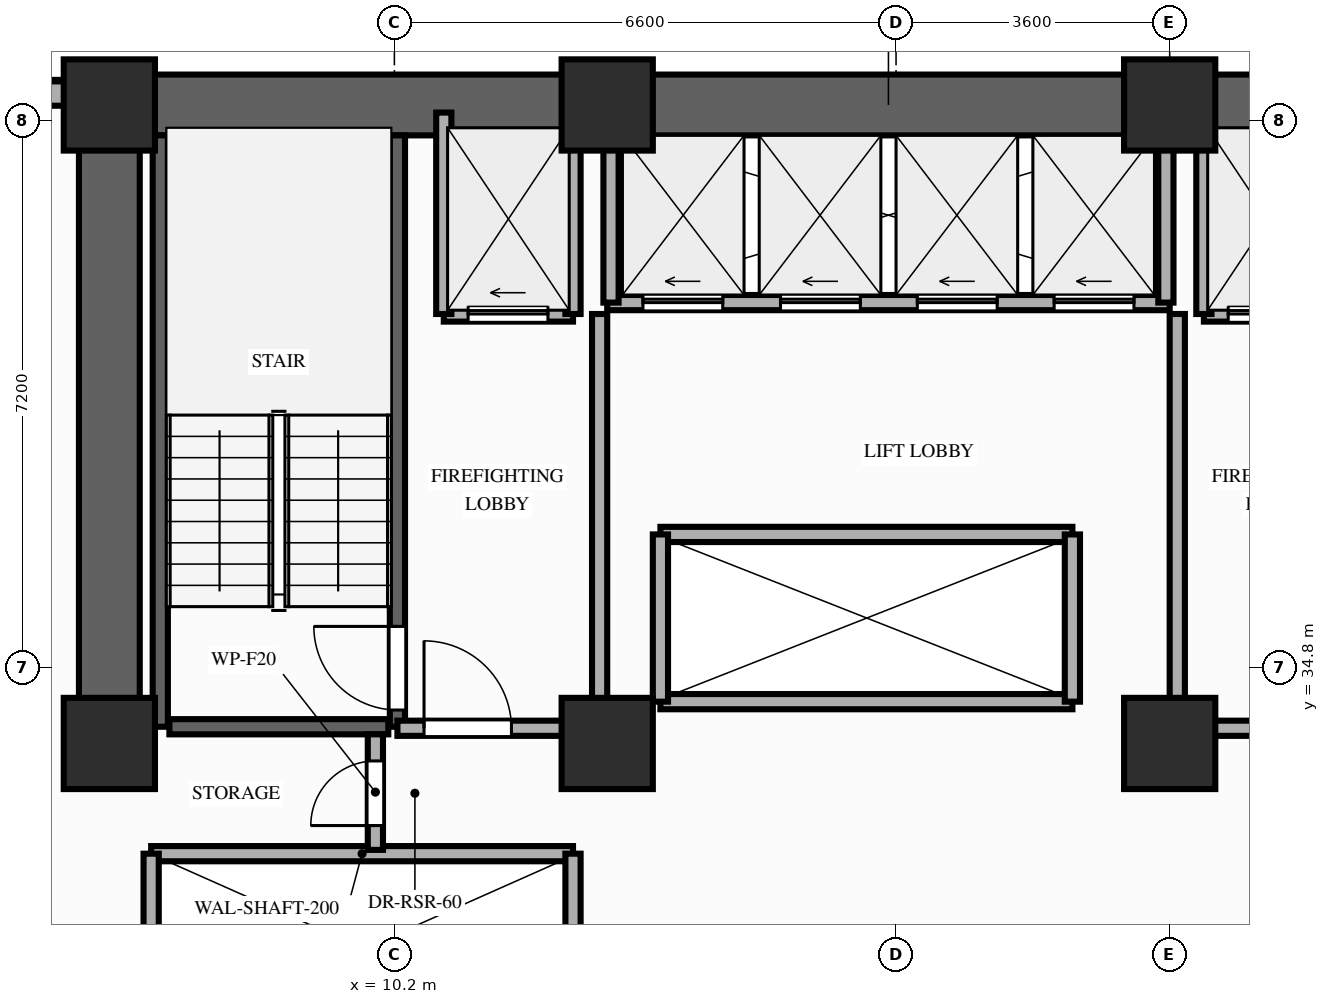
"""IFC4 building model, lengths in metres.
Left out: names, types, materials, properties, quantities, classifications, styles, units other than length and angle.
Written with IfcOpenShell. Run it as: python <this file> out.ifc"""

import sys

from ifc_helpers import new_model, si_unit, direction, frame, frame_2d, origin, origin_2d, place, context, subcontext, project, spatial, rectangle, extrude, element, fill, save


model = new_model("IFC4")
c1 = context("Model", 3, precision=1e-05, world=origin(), true_north=direction((0.0, 1.0)))
c2 = subcontext(c1, "Body", "Model", "MODEL_VIEW")
j1 = project(units=[si_unit("LENGTHUNIT", "METRE"), si_unit("PLANEANGLEUNIT", "RADIAN")], contexts=[c1])
p1 = place(None, origin())
s1 = spatial("IfcSite", under=j1, at=p1, CompositionType="ELEMENT")
p2 = place(p1, origin())
s2 = spatial("IfcBuilding", under=s1, at=p2, CompositionType="ELEMENT")
p3 = place(p2, frame((0.0, 0.0, 66.0)))
s3 = spatial("IfcBuildingStorey", under=s2, at=p3, CompositionType="ELEMENT", Elevation=66.0)
for number, where, z_axis, x_axis in (
    (1, (6.45, 33.8, 0.0), (0.0, 0.0, 1.0), (1.0, 0.0, 0.0)),
    (2, (13.0, 33.8, 0.0), (0.0, 0.0, 1.0), (1.0, 0.0, 0.0)),
    (3, (20.4, 33.8, 0.0), (0.0, 0.0, 1.0), (1.0, 0.0, 0.0)),
    (4, (6.45, 42.2, 0.0), (0.0, 0.0, 1.0), (1.0, 0.0, 0.0)),
    (5, (13.0, 42.2, 0.0), (0.0, 0.0, 1.0), (1.0, 0.0, 0.0)),
    (6, (20.4, 42.2, 0.0), (0.0, 0.0, 1.0), (1.0, 0.0, 0.0)),
):
    element("IfcColumn", number, at=place(p3, frame(where, z_axis=z_axis, x_axis=x_axis)), inside=s3, PredefinedType="COLUMN", context=c2, shape_type="SweptSolid", body=[
        extrude(rectangle(XDim=1.2, YDim=1.2, at=origin_2d()), origin(), (0.0, 0.0, 1.0), 3.2),
    ])
p4 = place(p3, frame((6.0, 42.35, 0.0), z_axis=(0.0, 0.0, 1.0), x_axis=(-1.0, 0.0, 0.0)))
e7 = element("IfcWall", 7, at=p4, inside=s3, PredefinedType="STANDARD", context=c2, shape_type="SweptSolid", body=[
    extrude(rectangle(XDim=2.0, YDim=0.32, at=frame_2d((1.0, 0.0))), origin(), (0.0, 0.0, 1.0), 3.02),
])
p5 = place(p3, frame((6.45, 42.2, 0.0), z_axis=(0.0, 0.0, 1.0), x_axis=(1.0, 0.0, 0.0)))
e8 = element("IfcWall", 8, at=p5, inside=s3, PredefinedType="SHEAR", context=c2, shape_type="SweptSolid", body=[
    extrude(rectangle(XDim=20.45, YDim=0.8, at=frame_2d((10.225, 0.0))), origin(), (0.0, 0.0, 1.0), 3.02),
])
p6 = place(p3, frame((6.45, 33.8, 0.0), z_axis=(0.0, 0.0, 1.0), x_axis=(0.0, 1.0, 0.0)))
e9 = element("IfcWall", 9, at=p6, inside=s3, PredefinedType="SHEAR", context=c2, shape_type="SweptSolid", body=[
    extrude(rectangle(XDim=7.95, YDim=0.8, at=frame_2d((3.975, 0.0))), origin(), (0.0, 0.0, 1.0), 3.02),
])
p7 = place(p3, frame((7.12, 34.02, 0.0), z_axis=(0.0, 0.0, 1.0), x_axis=(0.0, 1.0, 0.0)))
e10 = element("IfcWall", 10, at=p7, inside=s3, PredefinedType="SHEAR", context=c2, shape_type="SweptSolid", body=[
    extrude(rectangle(XDim=7.78, YDim=0.2, at=frame_2d((3.89, 0.0))), origin(), (0.0, 0.0, 1.0), 3.02),
])
p8 = place(p3, frame((10.24, 34.02, 0.0), z_axis=(0.0, 0.0, 1.0), x_axis=(0.0, 1.0, 0.0)))
e11 = element("IfcWall", 11, at=p8, inside=s3, PredefinedType="SHEAR", context=c2, shape_type="SweptSolid", body=[
    extrude(rectangle(XDim=7.78, YDim=0.2, at=frame_2d((3.89, 0.0))), origin(), (0.0, 0.0, 1.0), 3.02),
])
p9 = place(p8, frame((0.22, 0.0, 0.0)))
e12 = element("IfcOpeningElement", 12, at=p9, cuts=e11, PredefinedType="OPENING", context=c2, shape_type="SweptSolid", body=[
    extrude(rectangle(XDim=1.1, YDim=2.15, at=frame_2d((0.55, 1.075))), frame((0.0, 0.11, 0.0), z_axis=(0.0, -1.0, 0.0), x_axis=(1.0, 0.0, 0.0)), (0.0, 0.0, 1.0), 0.22),
])
p10 = place(p3, frame((7.24, 34.02, 0.0), z_axis=(0.0, 0.0, 1.0), x_axis=(1.0, 0.0, 0.0)))
e13 = element("IfcWall", 13, at=p10, inside=s3, PredefinedType="SHEAR", context=c2, shape_type="SweptSolid", body=[
    extrude(rectangle(XDim=2.88, YDim=0.2, at=frame_2d((1.44, 0.0))), origin(), (0.0, 0.0, 1.0), 3.02),
])
p11 = place(p3, frame((7.0, 32.35, 0.0), z_axis=(0.0, 0.0, 1.0), x_axis=(1.0, 0.0, 0.0)))
e14 = element("IfcWall", 14, at=p11, inside=s3, PredefinedType="MOVABLE", context=c2, shape_type="SweptSolid", body=[
    extrude(rectangle(XDim=5.55, YDim=0.2, at=frame_2d((2.775, 0.0))), origin(), (0.0, 0.0, 1.0), 3.02),
])
for number, where, z_axis, x_axis in (
    (15, (7.0, 29.85, 0.0), (0.0, 0.0, 1.0), (0.0, 1.0, 0.0)),
    (16, (12.55, 29.85, 0.0), (0.0, 0.0, 1.0), (0.0, 1.0, 0.0)),
):
    element("IfcWall", number, at=place(p3, frame(where, z_axis=z_axis, x_axis=x_axis)), inside=s3, PredefinedType="MOVABLE", context=c2, shape_type="SweptSolid", body=[
        extrude(rectangle(XDim=2.5, YDim=0.2, at=frame_2d((1.25, 0.0))), origin(), (0.0, 0.0, 1.0), 3.02),
    ])
p12 = place(p3, frame((10.85, 39.45, 0.0), z_axis=(0.0, 0.0, 1.0), x_axis=(1.0, 0.0, 0.0)))
e17 = element("IfcWall", 17, at=p12, inside=s3, PredefinedType="MOVABLE", context=c2, shape_type="SweptSolid", body=[
    extrude(rectangle(XDim=1.7, YDim=0.2, at=frame_2d((0.85, 0.0))), origin(), (0.0, 0.0, 1.0), 3.02),
])
p13 = place(p12, frame((0.32, 0.0, 0.0)))
e18 = element("IfcOpeningElement", 18, at=p13, cuts=e17, PredefinedType="OPENING", context=c2, shape_type="SweptSolid", body=[
    extrude(rectangle(XDim=1.05, YDim=2.15, at=frame_2d((0.525, 1.075))), frame((0.0, 0.11, 0.0), z_axis=(0.0, -1.0, 0.0), x_axis=(1.0, 0.0, 0.0)), (0.0, 0.0, 1.0), 0.22),
])
p14 = place(p3, frame((20.85, 39.45, 0.0), z_axis=(0.0, 0.0, 1.0), x_axis=(1.0, 0.0, 0.0)))
e19 = element("IfcWall", 19, at=p14, inside=s3, PredefinedType="MOVABLE", context=c2, shape_type="SweptSolid", body=[
    extrude(rectangle(XDim=1.7, YDim=0.2, at=frame_2d((0.85, 0.0))), origin(), (0.0, 0.0, 1.0), 3.02),
])
p15 = place(p14, frame((0.32, 0.0, 0.0)))
e20 = element("IfcOpeningElement", 20, at=p15, cuts=e19, PredefinedType="OPENING", context=c2, shape_type="SweptSolid", body=[
    extrude(rectangle(XDim=1.05, YDim=2.15, at=frame_2d((0.525, 1.075))), frame((0.0, 0.11, 0.0), z_axis=(0.0, -1.0, 0.0), x_axis=(1.0, 0.0, 0.0)), (0.0, 0.0, 1.0), 0.22),
])
for number, where, z_axis, x_axis in (
    (21, (10.85, 39.45, 0.0), (0.0, 0.0, 1.0), (0.0, 1.0, 0.0)),
    (22, (12.55, 39.45, 0.0), (0.0, 0.0, 1.0), (0.0, 1.0, 0.0)),
):
    element("IfcWall", number, at=place(p3, frame(where, z_axis=z_axis, x_axis=x_axis)), inside=s3, PredefinedType="MOVABLE", context=c2, shape_type="SweptSolid", body=[
        extrude(rectangle(XDim=2.65, YDim=0.2, at=frame_2d((1.325, 0.0))), origin(), (0.0, 0.0, 1.0), 2.41),
    ])
p16 = place(p3, frame((12.9, 34.0, 0.0), z_axis=(0.0, 0.0, 1.0), x_axis=(0.0, 1.0, 0.0)))
e23 = element("IfcWall", 23, at=p16, inside=s3, PredefinedType="PARTITIONING", context=c2, shape_type="SweptSolid", body=[
    extrude(rectangle(XDim=5.45, YDim=0.2, at=frame_2d((2.725, 0.0))), origin(), (0.0, 0.0, 1.0), 2.41),
])
p17 = place(p3, frame((10.24, 34.0, 0.0), z_axis=(0.0, 0.0, 1.0), x_axis=(1.0, 0.0, 0.0)))
e24 = element("IfcWall", 24, at=p17, inside=s3, PredefinedType="PARTITIONING", context=c2, shape_type="SweptSolid", body=[
    extrude(rectangle(XDim=2.66, YDim=0.2, at=frame_2d((1.33, 0.0))), origin(), (0.0, 0.0, 1.0), 2.41),
])
p18 = place(p17, frame((0.35, 0.0, 0.0)))
e25 = element("IfcOpeningElement", 25, at=p18, cuts=e24, PredefinedType="OPENING", context=c2, shape_type="SweptSolid", body=[
    extrude(rectangle(XDim=1.15, YDim=2.15, at=frame_2d((0.575, 1.075))), frame((0.0, 0.11, 0.0), z_axis=(0.0, -1.0, 0.0), x_axis=(1.0, 0.0, 0.0)), (0.0, 0.0, 1.0), 0.22),
])
p19 = place(p3, frame((20.85, 39.45, 0.0), z_axis=(0.0, 0.0, 1.0), x_axis=(0.0, 1.0, 0.0)))
e26 = element("IfcWall", 26, at=p19, inside=s3, PredefinedType="MOVABLE", context=c2, shape_type="SweptSolid", body=[
    extrude(rectangle(XDim=2.65, YDim=0.2, at=frame_2d((1.325, 0.0))), origin(), (0.0, 0.0, 1.0), 2.41),
])
p20 = place(p3, frame((20.5, 34.0, 0.0), z_axis=(0.0, 0.0, 1.0), x_axis=(0.0, 1.0, 0.0)))
e27 = element("IfcWall", 27, at=p20, inside=s3, PredefinedType="PARTITIONING", context=c2, shape_type="SweptSolid", body=[
    extrude(rectangle(XDim=5.45, YDim=0.2, at=frame_2d((2.725, 0.0))), origin(), (0.0, 0.0, 1.0), 2.41),
])
p21 = place(p3, frame((20.5, 34.0, 0.0), z_axis=(0.0, 0.0, 1.0), x_axis=(1.0, 0.0, 0.0)))
e28 = element("IfcWall", 28, at=p21, inside=s3, PredefinedType="PARTITIONING", context=c2, shape_type="SweptSolid", body=[
    extrude(rectangle(XDim=2.6, YDim=0.2, at=frame_2d((1.3, 0.0))), origin(), (0.0, 0.0, 1.0), 2.41),
])
p22 = place(p21, frame((1.05, 0.0, 0.0)))
e29 = element("IfcOpeningElement", 29, at=p22, cuts=e28, PredefinedType="OPENING", context=c2, shape_type="SweptSolid", body=[
    extrude(rectangle(XDim=1.15, YDim=2.15, at=frame_2d((0.575, 1.075))), frame((0.0, 0.11, 0.0), z_axis=(0.0, -1.0, 0.0), x_axis=(1.0, 0.0, 0.0)), (0.0, 0.0, 1.0), 0.22),
])
p23 = place(p3, frame((9.95, 32.4, 0.0), z_axis=(0.0, 0.0, 1.0), x_axis=(0.0, 1.0, 0.0)))
e30 = element("IfcWall", 30, at=p23, inside=s3, PredefinedType="PARTITIONING", context=c2, shape_type="SweptSolid", body=[
    extrude(rectangle(XDim=1.52, YDim=0.2, at=frame_2d((0.76, 0.0))), origin(), (0.0, 0.0, 1.0), 2.41),
])
p24 = place(p23, frame((0.32, 0.0, 0.0)))
e31 = element("IfcOpeningElement", 31, at=p24, cuts=e30, PredefinedType="OPENING", context=c2, shape_type="SweptSolid", body=[
    extrude(rectangle(XDim=0.85, YDim=2.05, at=frame_2d((0.425, 1.025))), frame((0.0, 0.11, 0.0), z_axis=(0.0, -1.0, 0.0), x_axis=(1.0, 0.0, 0.0)), (0.0, 0.0, 1.0), 0.22),
])
p25 = place(p3, frame((13.0, 39.6, 0.0), z_axis=(0.0, 0.0, 1.0), x_axis=(1.0, 0.0, 0.0)))
e32 = element("IfcWall", 32, at=p25, inside=s3, PredefinedType="MOVABLE", context=c2, shape_type="SweptSolid", body=[
    extrude(rectangle(XDim=7.4, YDim=0.2, at=frame_2d((3.7, 0.0))), origin(), (0.0, 0.0, 1.0), 3.02),
])
p26 = place(p25, frame((0.47, 0.0, 0.0)))
e33 = element("IfcOpeningElement", 33, at=p26, cuts=e32, PredefinedType="OPENING", context=c2, shape_type="SweptSolid", body=[
    extrude(rectangle(XDim=1.05, YDim=2.15, at=frame_2d((0.525, 1.075))), frame((0.0, 0.11, 0.0), z_axis=(0.0, -1.0, 0.0), x_axis=(1.0, 0.0, 0.0)), (0.0, 0.0, 1.0), 0.22),
])
p27 = place(p25, frame((2.28, 0.0, 0.0)))
e34 = element("IfcOpeningElement", 34, at=p27, cuts=e32, PredefinedType="OPENING", context=c2, shape_type="SweptSolid", body=[
    extrude(rectangle(XDim=1.05, YDim=2.15, at=frame_2d((0.525, 1.075))), frame((0.0, 0.11, 0.0), z_axis=(0.0, -1.0, 0.0), x_axis=(1.0, 0.0, 0.0)), (0.0, 0.0, 1.0), 0.22),
])
p28 = place(p25, frame((4.08, 0.0, 0.0)))
e35 = element("IfcOpeningElement", 35, at=p28, cuts=e32, PredefinedType="OPENING", context=c2, shape_type="SweptSolid", body=[
    extrude(rectangle(XDim=1.05, YDim=2.15, at=frame_2d((0.525, 1.075))), frame((0.0, 0.11, 0.0), z_axis=(0.0, -1.0, 0.0), x_axis=(1.0, 0.0, 0.0)), (0.0, 0.0, 1.0), 0.22),
])
p29 = place(p25, frame((5.88, 0.0, 0.0)))
e36 = element("IfcOpeningElement", 36, at=p29, cuts=e32, PredefinedType="OPENING", context=c2, shape_type="SweptSolid", body=[
    extrude(rectangle(XDim=1.05, YDim=2.15, at=frame_2d((0.525, 1.075))), frame((0.0, 0.11, 0.0), z_axis=(0.0, -1.0, 0.0), x_axis=(1.0, 0.0, 0.0)), (0.0, 0.0, 1.0), 0.22),
])
for number, where, z_axis, x_axis in (
    (37, (13.05, 39.6, 0.0), (0.0, 0.0, 1.0), (0.0, 1.0, 0.0)),
    (38, (20.35, 39.6, 0.0), (0.0, 0.0, 1.0), (0.0, 1.0, 0.0)),
):
    element("IfcWall", number, at=place(p3, frame(where, z_axis=z_axis, x_axis=x_axis)), inside=s3, PredefinedType="MOVABLE", context=c2, shape_type="SweptSolid", body=[
        extrude(rectangle(XDim=2.18, YDim=0.2, at=frame_2d((1.09, 0.0))), origin(), (0.0, 0.0, 1.0), 3.02),
    ])
for number, where, z_axis, x_axis in (
    (39, (13.7, 34.35, 0.0), (0.0, 0.0, 1.0), (1.0, 0.0, 0.0)),
    (40, (13.7, 36.55, 0.0), (0.0, 0.0, 1.0), (1.0, 0.0, 0.0)),
):
    element("IfcWall", number, at=place(p3, frame(where, z_axis=z_axis, x_axis=x_axis)), inside=s3, PredefinedType="MOVABLE", context=c2, shape_type="SweptSolid", body=[
        extrude(rectangle(XDim=5.42, YDim=0.2, at=frame_2d((2.71, 0.0))), origin(), (0.0, 0.0, 1.0), 3.02),
    ])
for number, where, z_axis, x_axis in (
    (41, (13.7, 34.35, 0.0), (0.0, 0.0, 1.0), (0.0, 1.0, 0.0)),
    (42, (19.12, 34.35, 0.0), (0.0, 0.0, 1.0), (0.0, 1.0, 0.0)),
):
    element("IfcWall", number, at=place(p3, frame(where, z_axis=z_axis, x_axis=x_axis)), inside=s3, PredefinedType="MOVABLE", context=c2, shape_type="SweptSolid", body=[
        extrude(rectangle(XDim=2.2, YDim=0.2, at=frame_2d((1.1, 0.0))), origin(), (0.0, 0.0, 1.0), 3.02),
    ])
p30 = place(p9, origin())
e43 = element("IfcDoor", 43, at=p30, inside=s3, OperationType="SINGLE_SWING_RIGHT", PredefinedType="DOOR", context=c2, shape_type="SweptSolid", body=[
    extrude(rectangle(XDim=1.1, YDim=2.15, at=frame_2d((0.55, 1.075))), frame((0.0, 0.025, 0.0), z_axis=(0.0, -1.0, 0.0), x_axis=(1.0, 0.0, 0.0)), (0.0, 0.0, 1.0), 0.05),
])
fill(e12, e43)
p31 = place(p13, origin())
e44 = element("IfcDoor", 44, at=p31, inside=s3, OperationType="SLIDING_TO_LEFT", PredefinedType="DOOR", context=c2, shape_type="SweptSolid", body=[
    extrude(rectangle(XDim=1.05, YDim=2.15, at=frame_2d((0.525, 1.075))), frame((0.0, 0.025, 0.0), z_axis=(0.0, -1.0, 0.0), x_axis=(1.0, 0.0, 0.0)), (0.0, 0.0, 1.0), 0.05),
])
fill(e18, e44)
p32 = place(p15, origin())
e45 = element("IfcDoor", 45, at=p32, inside=s3, OperationType="SLIDING_TO_LEFT", PredefinedType="DOOR", context=c2, shape_type="SweptSolid", body=[
    extrude(rectangle(XDim=1.05, YDim=2.15, at=frame_2d((0.525, 1.075))), frame((0.0, 0.025, 0.0), z_axis=(0.0, -1.0, 0.0), x_axis=(1.0, 0.0, 0.0)), (0.0, 0.0, 1.0), 0.05),
])
fill(e20, e45)
p33 = place(p18, origin())
e46 = element("IfcDoor", 46, at=p33, inside=s3, OperationType="SINGLE_SWING_LEFT", PredefinedType="DOOR", context=c2, shape_type="SweptSolid", body=[
    extrude(rectangle(XDim=1.15, YDim=2.15, at=frame_2d((0.575, 1.075))), frame((0.0, 0.025, 0.0), z_axis=(0.0, -1.0, 0.0), x_axis=(1.0, 0.0, 0.0)), (0.0, 0.0, 1.0), 0.05),
])
fill(e25, e46)
p34 = place(p24, origin())
e47 = element("IfcDoor", 47, at=p34, inside=s3, OperationType="SINGLE_SWING_LEFT", PredefinedType="DOOR", context=c2, shape_type="SweptSolid", body=[
    extrude(rectangle(XDim=0.85, YDim=2.05, at=frame_2d((0.425, 1.025))), frame((0.0, 0.025, 0.0), z_axis=(0.0, -1.0, 0.0), x_axis=(1.0, 0.0, 0.0)), (0.0, 0.0, 1.0), 0.05),
])
fill(e31, e47)
p35 = place(p26, origin())
e48 = element("IfcDoor", 48, at=p35, inside=s3, OperationType="SLIDING_TO_LEFT", PredefinedType="DOOR", context=c2, shape_type="SweptSolid", body=[
    extrude(rectangle(XDim=1.05, YDim=2.15, at=frame_2d((0.525, 1.075))), frame((0.0, 0.025, 0.0), z_axis=(0.0, -1.0, 0.0), x_axis=(1.0, 0.0, 0.0)), (0.0, 0.0, 1.0), 0.05),
])
fill(e33, e48)
p36 = place(p27, origin())
e49 = element("IfcDoor", 49, at=p36, inside=s3, OperationType="SLIDING_TO_LEFT", PredefinedType="DOOR", context=c2, shape_type="SweptSolid", body=[
    extrude(rectangle(XDim=1.05, YDim=2.15, at=frame_2d((0.525, 1.075))), frame((0.0, 0.025, 0.0), z_axis=(0.0, -1.0, 0.0), x_axis=(1.0, 0.0, 0.0)), (0.0, 0.0, 1.0), 0.05),
])
fill(e34, e49)
p37 = place(p28, origin())
e50 = element("IfcDoor", 50, at=p37, inside=s3, OperationType="SLIDING_TO_LEFT", PredefinedType="DOOR", context=c2, shape_type="SweptSolid", body=[
    extrude(rectangle(XDim=1.05, YDim=2.15, at=frame_2d((0.525, 1.075))), frame((0.0, 0.025, 0.0), z_axis=(0.0, -1.0, 0.0), x_axis=(1.0, 0.0, 0.0)), (0.0, 0.0, 1.0), 0.05),
])
fill(e35, e50)
p38 = place(p29, origin())
e51 = element("IfcDoor", 51, at=p38, inside=s3, OperationType="SLIDING_TO_LEFT", PredefinedType="DOOR", context=c2, shape_type="SweptSolid", body=[
    extrude(rectangle(XDim=1.05, YDim=2.15, at=frame_2d((0.525, 1.075))), frame((0.0, 0.025, 0.0), z_axis=(0.0, -1.0, 0.0), x_axis=(1.0, 0.0, 0.0)), (0.0, 0.0, 1.0), 0.05),
])
fill(e36, e51)
save(model, sys.argv[1])
